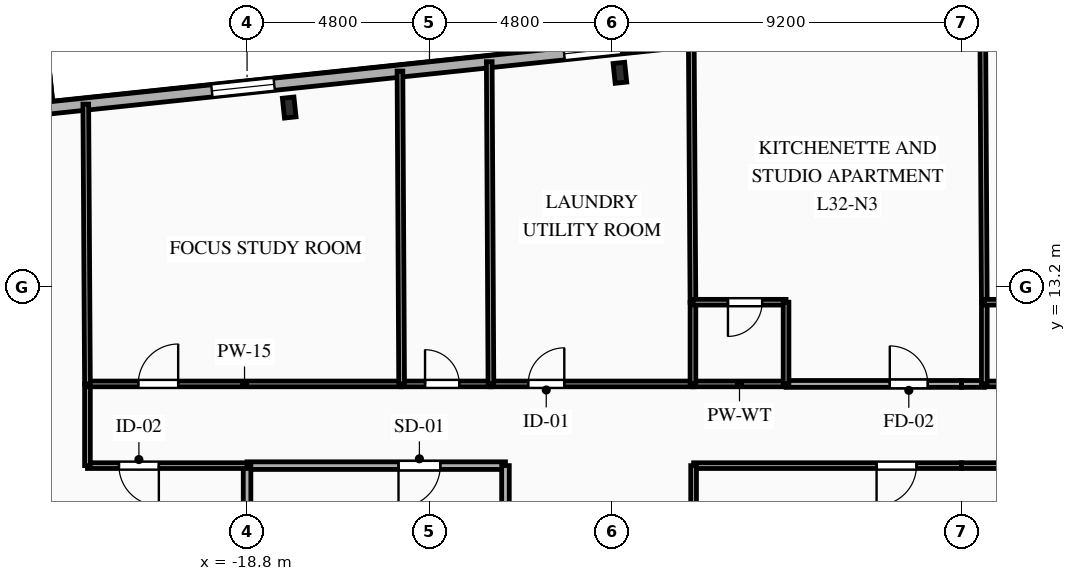
"""IFC4 building model, lengths in metres.
Left out: names, types, materials, properties, quantities, classifications, styles, units other than length and angle.
Written with IfcOpenShell. Run it as: python <this file> out.ifc"""

import sys

from ifc_helpers import new_model, si_unit, direction, frame, frame_2d, origin, origin_2d, place, context, subcontext, project, spatial, rectangle, i_section, extrude, element, fill, save


model = new_model("IFC4")
c1 = context("Model", 3, precision=1e-05, world=origin(), true_north=direction((0.0, 1.0)))
c2 = subcontext(c1, "Body", "Model", "MODEL_VIEW")
j1 = project(units=[si_unit("LENGTHUNIT", "METRE"), si_unit("PLANEANGLEUNIT", "RADIAN")], contexts=[c1])
p1 = place(None, origin())
s1 = spatial("IfcSite", under=j1, at=p1, CompositionType="ELEMENT")
p2 = place(p1, origin())
s2 = spatial("IfcBuilding", under=s1, at=p2, CompositionType="ELEMENT")
p3 = place(p2, frame((0.0, 0.0, 115.85)))
s3 = spatial("IfcBuildingStorey", under=s2, at=p3, CompositionType="ELEMENT", Elevation=115.85)
for number, where, z_axis, x_axis in (
    (1, (-8.989, 18.836, 0.0), (0.0, 0.0, 1.0), (0.995, 0.105, 0.0)),
    (2, (-17.691, 17.922, 0.0), (0.0, 0.0, 1.0), (0.995, 0.105, 0.0)),
):
    element("IfcColumn", number, at=place(p3, frame(where, z_axis=z_axis, x_axis=x_axis)), inside=s3, PredefinedType="COLUMN", context=c2, shape_type="SweptSolid", body=[
        extrude(i_section(OverallWidth=0.306, OverallDepth=0.524, WebThickness=0.021, FlangeThickness=0.04, FilletRadius=0.027, at=origin_2d()), origin(), (0.0, 0.0, 1.0), 3.35),
    ])
p4 = place(p3, frame((-27.107, 17.586, 0.0), z_axis=(0.0, 0.0, 1.0), x_axis=(0.994521628355, 0.104531003701, 0.0)))
e3 = element("IfcWall", 3, at=p4, inside=s3, PredefinedType="SOLIDWALL", context=c2, shape_type="SweptSolid", body=[
    extrude(rectangle(XDim=53.8, YDim=0.32, at=frame_2d((26.9, 0.0))), origin(), (0.0, 0.0, 1.0), 3.045),
])
p5 = place(p4, frame((1.457, 0.0, 0.85)))
e4 = element("IfcOpeningElement", 4, at=p5, cuts=e3, PredefinedType="OPENING", context=c2, shape_type="SweptSolid", body=[
    extrude(rectangle(XDim=1.65, YDim=1.85, at=frame_2d((0.825, 0.925))), frame((0.0, 0.17, 0.0), z_axis=(0.0, -1.0, 0.0), x_axis=(1.0, 0.0, 0.0)), (0.0, 0.0, 1.0), 0.34),
])
p6 = place(p4, frame((7.421, 0.0, 0.85)))
e5 = element("IfcOpeningElement", 5, at=p6, cuts=e3, PredefinedType="OPENING", context=c2, shape_type="SweptSolid", body=[
    extrude(rectangle(XDim=1.65, YDim=1.85, at=frame_2d((0.825, 0.925))), frame((0.0, 0.17, 0.0), z_axis=(0.0, -1.0, 0.0), x_axis=(1.0, 0.0, 0.0)), (0.0, 0.0, 1.0), 0.34),
])
p7 = place(p4, frame((16.743, 0.0, 0.85)))
e6 = element("IfcOpeningElement", 6, at=p7, cuts=e3, PredefinedType="OPENING", context=c2, shape_type="SweptSolid", body=[
    extrude(rectangle(XDim=1.5, YDim=1.85, at=frame_2d((0.75, 0.925))), frame((0.0, 0.17, 0.0), z_axis=(0.0, -1.0, 0.0), x_axis=(1.0, 0.0, 0.0)), (0.0, 0.0, 1.0), 0.34),
])
p8 = place(p4, frame((22.918, 0.0, 0.85)))
e7 = element("IfcOpeningElement", 7, at=p8, cuts=e3, PredefinedType="OPENING", context=c2, shape_type="SweptSolid", body=[
    extrude(rectangle(XDim=2.2, YDim=1.85, at=frame_2d((1.1, 0.925))), frame((0.0, 0.17, 0.0), z_axis=(0.0, -1.0, 0.0), x_axis=(1.0, 0.0, 0.0)), (0.0, 0.0, 1.0), 0.34),
])
p9 = place(p4, frame((30.604, 0.0, 0.85)))
e8 = element("IfcOpeningElement", 8, at=p9, cuts=e3, PredefinedType="OPENING", context=c2, shape_type="SweptSolid", body=[
    extrude(rectangle(XDim=2.2, YDim=1.85, at=frame_2d((1.1, 0.925))), frame((0.0, 0.17, 0.0), z_axis=(0.0, -1.0, 0.0), x_axis=(1.0, 0.0, 0.0)), (0.0, 0.0, 1.0), 0.34),
])
p10 = place(p4, frame((38.289, 0.0, 0.85)))
e9 = element("IfcOpeningElement", 9, at=p10, cuts=e3, PredefinedType="OPENING", context=c2, shape_type="SweptSolid", body=[
    extrude(rectangle(XDim=2.2, YDim=1.85, at=frame_2d((1.1, 0.925))), frame((0.0, 0.17, 0.0), z_axis=(0.0, -1.0, 0.0), x_axis=(1.0, 0.0, 0.0)), (0.0, 0.0, 1.0), 0.34),
])
p11 = place(p4, frame((44.208, 0.0, 0.85)))
e10 = element("IfcOpeningElement", 10, at=p11, cuts=e3, PredefinedType="OPENING", context=c2, shape_type="SweptSolid", body=[
    extrude(rectangle(XDim=1.65, YDim=1.85, at=frame_2d((0.825, 0.925))), frame((0.0, 0.17, 0.0), z_axis=(0.0, -1.0, 0.0), x_axis=(1.0, 0.0, 0.0)), (0.0, 0.0, 1.0), 0.34),
])
p12 = place(p4, frame((47.771, 0.0, 0.85)))
e11 = element("IfcOpeningElement", 11, at=p12, cuts=e3, PredefinedType="OPENING", context=c2, shape_type="SweptSolid", body=[
    extrude(rectangle(XDim=1.65, YDim=1.85, at=frame_2d((0.825, 0.925))), frame((0.0, 0.17, 0.0), z_axis=(0.0, -1.0, 0.0), x_axis=(1.0, 0.0, 0.0)), (0.0, 0.0, 1.0), 0.34),
])
p13 = place(p4, frame((51.129, 0.0, 0.85)))
e12 = element("IfcOpeningElement", 12, at=p13, cuts=e3, PredefinedType="OPENING", context=c2, shape_type="SweptSolid", body=[
    extrude(rectangle(XDim=1.5, YDim=1.85, at=frame_2d((0.75, 0.925))), frame((0.0, 0.17, 0.0), z_axis=(0.0, -1.0, 0.0), x_axis=(1.0, 0.0, 0.0)), (0.0, 0.0, 1.0), 0.34),
])
p14 = place(p3, frame((-12.0, 8.5, 0.0), z_axis=(0.0, 0.0, 1.0), x_axis=(-1.0, 0.0, 0.0)))
e13 = element("IfcWall", 13, at=p14, inside=s3, PredefinedType="PARTITIONING", context=c2, shape_type="SweptSolid", body=[
    extrude(rectangle(XDim=6.8, YDim=0.2, at=frame_2d((3.4, 0.0))), origin(), (0.0, 0.0, 1.0), 3.045),
])
p15 = place(p14, frame((1.715, 0.0, 0.0)))
e14 = element("IfcOpeningElement", 14, at=p15, cuts=e13, PredefinedType="OPENING", context=c2, shape_type="SweptSolid", body=[
    extrude(rectangle(XDim=1.1, YDim=2.15, at=frame_2d((0.55, 1.075))), frame((0.0, 0.11, 0.0), z_axis=(0.0, -1.0, 0.0), x_axis=(1.0, 0.0, 0.0)), (0.0, 0.0, 1.0), 0.22),
])
p16 = place(p3, frame((-12.0, 5.6, 0.0), z_axis=(0.0, 0.0, 1.0), x_axis=(0.0, 1.0, 0.0)))
e15 = element("IfcWall", 15, at=p16, inside=s3, PredefinedType="PARTITIONING", context=c2, shape_type="SweptSolid", body=[
    extrude(rectangle(XDim=2.9, YDim=0.2, at=frame_2d((1.45, 0.0))), origin(), (0.0, 0.0, 1.0), 3.045),
])
p17 = place(p3, frame((-18.8, 8.5, 0.0), z_axis=(0.0, 0.0, 1.0), x_axis=(0.0, -1.0, 0.0)))
e16 = element("IfcWall", 16, at=p17, inside=s3, PredefinedType="PARTITIONING", context=c2, shape_type="SweptSolid", body=[
    extrude(rectangle(XDim=2.9, YDim=0.2, at=frame_2d((1.45, 0.0))), origin(), (0.0, 0.0, 1.0), 2.53),
])
p18 = place(p3, frame((-18.8, 8.5, 0.0), z_axis=(0.0, 0.0, 1.0), x_axis=(-1.0, 0.0, 0.0)))
e17 = element("IfcWall", 17, at=p18, inside=s3, PredefinedType="PARTITIONING", context=c2, shape_type="SweptSolid", body=[
    extrude(rectangle(XDim=4.2, YDim=0.15, at=frame_2d((2.1, 0.0))), origin(), (0.0, 0.0, 1.0), 3.045),
])
p19 = place(p18, frame((2.321, 0.0, 0.0)))
e18 = element("IfcOpeningElement", 18, at=p19, cuts=e17, PredefinedType="OPENING", context=c2, shape_type="SweptSolid", body=[
    extrude(rectangle(XDim=1.05, YDim=2.15, at=frame_2d((0.525, 1.075))), frame((0.0, 0.085, 0.0), z_axis=(0.0, -1.0, 0.0), x_axis=(1.0, 0.0, 0.0)), (0.0, 0.0, 1.0), 0.17),
])
p20 = place(p3, frame((-23.0, 8.5, 0.0), z_axis=(0.0, 0.0, 1.0), x_axis=(0.0, 1.0, 0.0)))
e19 = element("IfcWall", 19, at=p20, inside=s3, PredefinedType="PARTITIONING", context=c2, shape_type="SweptSolid", body=[
    extrude(rectangle(XDim=2.15, YDim=0.15, at=frame_2d((1.075, 0.0))), origin(), (0.0, 0.0, 1.0), 3.045),
])
p21 = place(p3, frame((-23.0, 10.65, 0.0), z_axis=(0.0, 0.0, 1.0), x_axis=(1.0, 0.0, 0.0)))
e20 = element("IfcWall", 20, at=p21, inside=s3, PredefinedType="PARTITIONING", context=c2, shape_type="SweptSolid", body=[
    extrude(rectangle(XDim=8.267, YDim=0.15, at=frame_2d((4.134, 0.0))), origin(), (0.0, 0.0, 1.0), 3.045),
])
p22 = place(p21, frame((1.337, 0.0, 0.0)))
e21 = element("IfcOpeningElement", 21, at=p22, cuts=e20, PredefinedType="OPENING", context=c2, shape_type="SweptSolid", body=[
    extrude(rectangle(XDim=1.05, YDim=2.15, at=frame_2d((0.525, 1.075))), frame((0.0, 0.085, 0.0), z_axis=(0.0, -1.0, 0.0), x_axis=(1.0, 0.0, 0.0)), (0.0, 0.0, 1.0), 0.17),
])
p23 = place(p3, frame((-14.733, 10.65, 0.0), z_axis=(0.0, 0.0, 1.0), x_axis=(1.0, 0.0, 0.0)))
e22 = element("IfcWall", 22, at=p23, inside=s3, PredefinedType="PLUMBINGWALL", context=c2, shape_type="SweptSolid", body=[
    extrude(rectangle(XDim=2.35, YDim=0.15, at=frame_2d((1.175, 0.0))), origin(), (0.0, 0.0, 1.0), 3.045),
])
p24 = place(p23, frame((0.616, 0.0, 0.0)))
e23 = element("IfcOpeningElement", 23, at=p24, cuts=e22, PredefinedType="OPENING", context=c2, shape_type="SweptSolid", body=[
    extrude(rectangle(XDim=0.9, YDim=2.1, at=frame_2d((0.45, 1.05))), frame((0.0, 0.085, 0.0), z_axis=(0.0, -1.0, 0.0), x_axis=(1.0, 0.0, 0.0)), (0.0, 0.0, 1.0), 0.17),
])
p25 = place(p3, frame((-12.383, 10.65, 0.0), z_axis=(0.0, 0.0, 1.0), x_axis=(1.0, 0.0, 0.0)))
e24 = element("IfcWall", 24, at=p25, inside=s3, PredefinedType="PARTITIONING", context=c2, shape_type="SweptSolid", body=[
    extrude(rectangle(XDim=5.316, YDim=0.15, at=frame_2d((2.658, 0.0))), origin(), (0.0, 0.0, 1.0), 3.045),
])
p26 = place(p25, frame((0.981, 0.0, 0.0)))
e25 = element("IfcOpeningElement", 25, at=p26, cuts=e24, PredefinedType="OPENING", context=c2, shape_type="SweptSolid", body=[
    extrude(rectangle(XDim=0.95, YDim=2.1, at=frame_2d((0.475, 1.05))), frame((0.0, 0.085, 0.0), z_axis=(0.0, -1.0, 0.0), x_axis=(1.0, 0.0, 0.0)), (0.0, 0.0, 1.0), 0.17),
])
p27 = place(p3, frame((-4.617, 10.65, 0.0), z_axis=(0.0, 0.0, 1.0), x_axis=(1.0, 0.0, 0.0)))
e26 = element("IfcWall", 26, at=p27, inside=s3, PredefinedType="PARTITIONING", context=c2, shape_type="SweptSolid", body=[
    extrude(rectangle(XDim=4.617, YDim=0.18, at=frame_2d((2.309, 0.0))), origin(), (0.0, 0.0, 1.0), 3.045),
])
p28 = place(p27, frame((2.73, 0.0, 0.0)))
e27 = element("IfcOpeningElement", 27, at=p28, cuts=e26, PredefinedType="OPENING", context=c2, shape_type="SweptSolid", body=[
    extrude(rectangle(XDim=1.0, YDim=2.15, at=frame_2d((0.5, 1.075))), frame((0.0, 0.1, 0.0), z_axis=(0.0, -1.0, 0.0), x_axis=(1.0, 0.0, 0.0)), (0.0, 0.0, 1.0), 0.2),
])
p29 = place(p3, frame((-7.067, 10.65, 0.0), z_axis=(0.0, 0.0, 1.0), x_axis=(1.0, 0.0, 0.0)))
e28 = element("IfcWall", 28, at=p29, inside=s3, PredefinedType="PLUMBINGWALL", context=c2, shape_type="SweptSolid", body=[
    extrude(rectangle(XDim=2.45, YDim=0.15, at=frame_2d((1.225, 0.0))), origin(), (0.0, 0.0, 1.0), 3.045),
])
p30 = place(p3, frame((0.0, 8.5, 0.0), z_axis=(0.0, 0.0, 1.0), x_axis=(-1.0, 0.0, 0.0)))
e29 = element("IfcWall", 29, at=p30, inside=s3, PredefinedType="PARTITIONING", context=c2, shape_type="SweptSolid", body=[
    extrude(rectangle(XDim=7.05, YDim=0.15, at=frame_2d((3.525, 0.0))), origin(), (0.0, 0.0, 1.0), 3.045),
])
p31 = place(p30, frame((1.185, 0.0, 0.0)))
e30 = element("IfcOpeningElement", 30, at=p31, cuts=e29, PredefinedType="OPENING", context=c2, shape_type="SweptSolid", body=[
    extrude(rectangle(XDim=1.05, YDim=2.15, at=frame_2d((0.525, 1.075))), frame((0.0, 0.085, 0.0), z_axis=(0.0, -1.0, 0.0), x_axis=(1.0, 0.0, 0.0)), (0.0, 0.0, 1.0), 0.17),
])
p32 = place(p3, frame((0.0, 10.65, 0.0), z_axis=(0.0, 0.0, 1.0), x_axis=(1.0, 0.0, 0.0)))
e31 = element("IfcWall", 31, at=p32, inside=s3, PredefinedType="PARTITIONING", context=c2, shape_type="SweptSolid", body=[
    extrude(rectangle(XDim=0.6, YDim=0.18, at=frame_2d((0.3, 0.0))), origin(), (0.0, 0.0, 1.0), 3.045),
])
p33 = place(p3, frame((0.6, 10.65, 0.0), z_axis=(0.0, 0.0, 1.0), x_axis=(1.0, 0.0, 0.0)))
e32 = element("IfcWall", 32, at=p33, inside=s3, PredefinedType="PLUMBINGWALL", context=c2, shape_type="SweptSolid", body=[
    extrude(rectangle(XDim=2.45, YDim=0.15, at=frame_2d((1.225, 0.0))), origin(), (0.0, 0.0, 1.0), 3.045),
])
for number, where, z_axis, x_axis in (
    (33, (7.05, 8.5, 0.0), (0.0, 0.0, 1.0), (-1.0, 0.0, 0.0)),
    (34, (-7.05, 8.5, 0.0), (0.0, 0.0, 1.0), (0.0, -1.0, 0.0)),
):
    element("IfcWall", number, at=place(p3, frame(where, z_axis=z_axis, x_axis=x_axis)), inside=s3, PredefinedType="PARTITIONING", context=c2, shape_type="SweptSolid", body=[
        extrude(rectangle(XDim=7.05, YDim=0.15, at=frame_2d((3.525, 0.0))), origin(), (0.0, 0.0, 1.0), 3.045),
    ])
p34 = place(p3, frame((-23.044, 18.013, 0.0), z_axis=(0.0, 0.0, 1.0), x_axis=(0.005968459246, -0.999982188588, 0.0)))
e35 = element("IfcWall", 35, at=p34, inside=s3, PredefinedType="PARTITIONING", context=c2, shape_type="SweptSolid", body=[
    extrude(rectangle(XDim=7.363, YDim=0.15, at=frame_2d((3.682, 0.0))), origin(), (0.0, 0.0, 1.0), 3.045),
])
p35 = place(p3, frame((-14.777, 18.882, 0.0), z_axis=(0.0, 0.0, 1.0), x_axis=(0.005338477179, -0.999985750229, 0.0)))
e36 = element("IfcWall", 36, at=p35, inside=s3, PredefinedType="PLUMBINGWALL", context=c2, shape_type="SweptSolid", body=[
    extrude(rectangle(XDim=8.232, YDim=0.15, at=frame_2d((4.116, 0.0))), origin(), (0.0, 0.0, 1.0), 3.045),
])
p36 = place(p3, frame((-12.427, 19.129, 0.0), z_axis=(0.0, 0.0, 1.0), x_axis=(0.005182918666, -0.999986568587, 0.0)))
e37 = element("IfcWall", 37, at=p36, inside=s3, PredefinedType="PLUMBINGWALL", context=c2, shape_type="SweptSolid", body=[
    extrude(rectangle(XDim=8.479, YDim=0.15, at=frame_2d((4.239, 0.0))), origin(), (0.0, 0.0, 1.0), 3.045),
])
p37 = place(p3, frame((-7.111, 19.688, 0.0), z_axis=(0.0, 0.0, 1.0), x_axis=(0.006380360007, -0.999979645296, 0.0)))
e38 = element("IfcWall", 38, at=p37, inside=s3, PredefinedType="PARTITIONING", context=c2, shape_type="SweptSolid", body=[
    extrude(rectangle(XDim=6.888, YDim=0.15, at=frame_2d((3.444, 0.0))), origin(), (0.0, 0.0, 1.0), 3.045),
])
p38 = place(p3, frame((-7.067, 12.8, 0.0), z_axis=(0.0, 0.0, 1.0), x_axis=(0.0, -1.0, 0.0)))
e39 = element("IfcWall", 39, at=p38, inside=s3, PredefinedType="PLUMBINGWALL", context=c2, shape_type="SweptSolid", body=[
    extrude(rectangle(XDim=2.15, YDim=0.15, at=frame_2d((1.075, 0.0))), origin(), (0.0, 0.0, 1.0), 3.045),
])
p39 = place(p3, frame((-4.617, 12.8, 0.0), z_axis=(0.0, 0.0, 1.0), x_axis=(-1.0, 0.0, 0.0)))
e40 = element("IfcWall", 40, at=p39, inside=s3, PredefinedType="PLUMBINGWALL", context=c2, shape_type="SweptSolid", body=[
    extrude(rectangle(XDim=2.45, YDim=0.15, at=frame_2d((1.225, 0.0))), origin(), (0.0, 0.0, 1.0), 3.045),
])
p40 = place(p39, frame((0.629, 0.0, 0.0)))
e41 = element("IfcOpeningElement", 41, at=p40, cuts=e40, PredefinedType="OPENING", context=c2, shape_type="SweptSolid", body=[
    extrude(rectangle(XDim=0.9, YDim=2.1, at=frame_2d((0.45, 1.05))), frame((0.0, 0.085, 0.0), z_axis=(0.0, -1.0, 0.0), x_axis=(1.0, 0.0, 0.0)), (0.0, 0.0, 1.0), 0.17),
])
p41 = place(p3, frame((-4.617, 10.65, 0.0), z_axis=(0.0, 0.0, 1.0), x_axis=(0.0, 1.0, 0.0)))
e42 = element("IfcWall", 42, at=p41, inside=s3, PredefinedType="PLUMBINGWALL", context=c2, shape_type="SweptSolid", body=[
    extrude(rectangle(XDim=2.15, YDim=0.15, at=frame_2d((1.075, 0.0))), origin(), (0.0, 0.0, 1.0), 3.045),
])
p42 = place(p3, frame((0.556, 20.493, 0.0), z_axis=(0.0, 0.0, 1.0), x_axis=(0.005712016487, -0.999983686301, 0.0)))
e43 = element("IfcWall", 43, at=p42, inside=s3, PredefinedType="PARTITIONING", context=c2, shape_type="SweptSolid", body=[
    extrude(rectangle(XDim=7.694, YDim=0.15, at=frame_2d((3.847, 0.0))), origin(), (0.0, 0.0, 1.0), 3.045),
])
p43 = place(p3, frame((0.6, 12.8, 0.0), z_axis=(0.0, 0.0, 1.0), x_axis=(0.0, -1.0, 0.0)))
e44 = element("IfcWall", 44, at=p43, inside=s3, PredefinedType="PLUMBINGWALL", context=c2, shape_type="SweptSolid", body=[
    extrude(rectangle(XDim=2.15, YDim=0.15, at=frame_2d((1.075, 0.0))), origin(), (0.0, 0.0, 1.0), 3.045),
])
p44 = place(p3, frame((3.05, 12.8, 0.0), z_axis=(0.0, 0.0, 1.0), x_axis=(-1.0, 0.0, 0.0)))
e45 = element("IfcWall", 45, at=p44, inside=s3, PredefinedType="PLUMBINGWALL", context=c2, shape_type="SweptSolid", body=[
    extrude(rectangle(XDim=2.45, YDim=0.15, at=frame_2d((1.225, 0.0))), origin(), (0.0, 0.0, 1.0), 3.045),
])
p45 = place(p44, frame((0.629, 0.0, 0.0)))
e46 = element("IfcOpeningElement", 46, at=p45, cuts=e45, PredefinedType="OPENING", context=c2, shape_type="SweptSolid", body=[
    extrude(rectangle(XDim=0.9, YDim=2.1, at=frame_2d((0.45, 1.05))), frame((0.0, 0.085, 0.0), z_axis=(0.0, -1.0, 0.0), x_axis=(1.0, 0.0, 0.0)), (0.0, 0.0, 1.0), 0.17),
])
p46 = place(p6, origin())
e47 = element("IfcWindow", 47, at=p46, inside=s3, PartitioningType="SINGLE_PANEL", PredefinedType="WINDOW", context=c2, shape_type="SweptSolid", body=[
    extrude(rectangle(XDim=1.65, YDim=1.85, at=frame_2d((0.825, 0.925))), frame((0.0, 0.03, 0.0), z_axis=(0.0, -1.0, 0.0), x_axis=(1.0, 0.0, 0.0)), (0.0, 0.0, 1.0), 0.06),
])
fill(e5, e47)
p47 = place(p7, origin())
e48 = element("IfcWindow", 48, at=p47, inside=s3, PartitioningType="SINGLE_PANEL", PredefinedType="WINDOW", context=c2, shape_type="SweptSolid", body=[
    extrude(rectangle(XDim=1.5, YDim=1.85, at=frame_2d((0.75, 0.925))), frame((0.0, 0.03, 0.0), z_axis=(0.0, -1.0, 0.0), x_axis=(1.0, 0.0, 0.0)), (0.0, 0.0, 1.0), 0.06),
])
fill(e6, e48)
p48 = place(p15, origin())
e49 = element("IfcDoor", 49, at=p48, inside=s3, OperationType="SINGLE_SWING_RIGHT", PredefinedType="DOOR", context=c2, shape_type="SweptSolid", body=[
    extrude(rectangle(XDim=1.1, YDim=2.15, at=frame_2d((0.55, 1.075))), frame((0.0, 0.025, 0.0), z_axis=(0.0, -1.0, 0.0), x_axis=(1.0, 0.0, 0.0)), (0.0, 0.0, 1.0), 0.05),
])
fill(e14, e49)
p49 = place(p19, origin())
e50 = element("IfcDoor", 50, at=p49, inside=s3, OperationType="SINGLE_SWING_LEFT", PredefinedType="DOOR", context=c2, shape_type="SweptSolid", body=[
    extrude(rectangle(XDim=1.05, YDim=2.15, at=frame_2d((0.525, 1.075))), frame((0.0, 0.025, 0.0), z_axis=(0.0, -1.0, 0.0), x_axis=(1.0, 0.0, 0.0)), (0.0, 0.0, 1.0), 0.05),
])
fill(e18, e50)
p50 = place(p22, origin())
e51 = element("IfcDoor", 51, at=p50, inside=s3, OperationType="SINGLE_SWING_RIGHT", PredefinedType="DOOR", context=c2, shape_type="SweptSolid", body=[
    extrude(rectangle(XDim=1.05, YDim=2.15, at=frame_2d((0.525, 1.075))), frame((0.0, 0.025, 0.0), z_axis=(0.0, -1.0, 0.0), x_axis=(1.0, 0.0, 0.0)), (0.0, 0.0, 1.0), 0.05),
])
fill(e21, e51)
p51 = place(p24, origin())
e52 = element("IfcDoor", 52, at=p51, inside=s3, OperationType="SINGLE_SWING_LEFT", PredefinedType="DOOR", context=c2, shape_type="SweptSolid", body=[
    extrude(rectangle(XDim=0.9, YDim=2.1, at=frame_2d((0.45, 1.05))), frame((0.0, 0.025, 0.0), z_axis=(0.0, -1.0, 0.0), x_axis=(1.0, 0.0, 0.0)), (0.0, 0.0, 1.0), 0.05),
])
fill(e23, e52)
p52 = place(p26, origin())
e53 = element("IfcDoor", 53, at=p52, inside=s3, OperationType="SINGLE_SWING_RIGHT", PredefinedType="DOOR", context=c2, shape_type="SweptSolid", body=[
    extrude(rectangle(XDim=0.95, YDim=2.1, at=frame_2d((0.475, 1.05))), frame((0.0, 0.025, 0.0), z_axis=(0.0, -1.0, 0.0), x_axis=(1.0, 0.0, 0.0)), (0.0, 0.0, 1.0), 0.05),
])
fill(e25, e53)
p53 = place(p28, origin())
e54 = element("IfcDoor", 54, at=p53, inside=s3, OperationType="SINGLE_SWING_LEFT", PredefinedType="DOOR", context=c2, shape_type="SweptSolid", body=[
    extrude(rectangle(XDim=1.0, YDim=2.15, at=frame_2d((0.5, 1.075))), frame((0.0, 0.025, 0.0), z_axis=(0.0, -1.0, 0.0), x_axis=(1.0, 0.0, 0.0)), (0.0, 0.0, 1.0), 0.05),
])
fill(e27, e54)
p54 = place(p31, origin())
e55 = element("IfcDoor", 55, at=p54, inside=s3, OperationType="SINGLE_SWING_RIGHT", PredefinedType="DOOR", context=c2, shape_type="SweptSolid", body=[
    extrude(rectangle(XDim=1.05, YDim=2.15, at=frame_2d((0.525, 1.075))), frame((0.0, 0.025, 0.0), z_axis=(0.0, -1.0, 0.0), x_axis=(1.0, 0.0, 0.0)), (0.0, 0.0, 1.0), 0.05),
])
fill(e30, e55)
p55 = place(p40, origin())
e56 = element("IfcDoor", 56, at=p55, inside=s3, OperationType="SINGLE_SWING_RIGHT", PredefinedType="DOOR", context=c2, shape_type="SweptSolid", body=[
    extrude(rectangle(XDim=0.9, YDim=2.1, at=frame_2d((0.45, 1.05))), frame((0.0, 0.025, 0.0), z_axis=(0.0, -1.0, 0.0), x_axis=(1.0, 0.0, 0.0)), (0.0, 0.0, 1.0), 0.05),
])
fill(e41, e56)
save(model, sys.argv[1])
